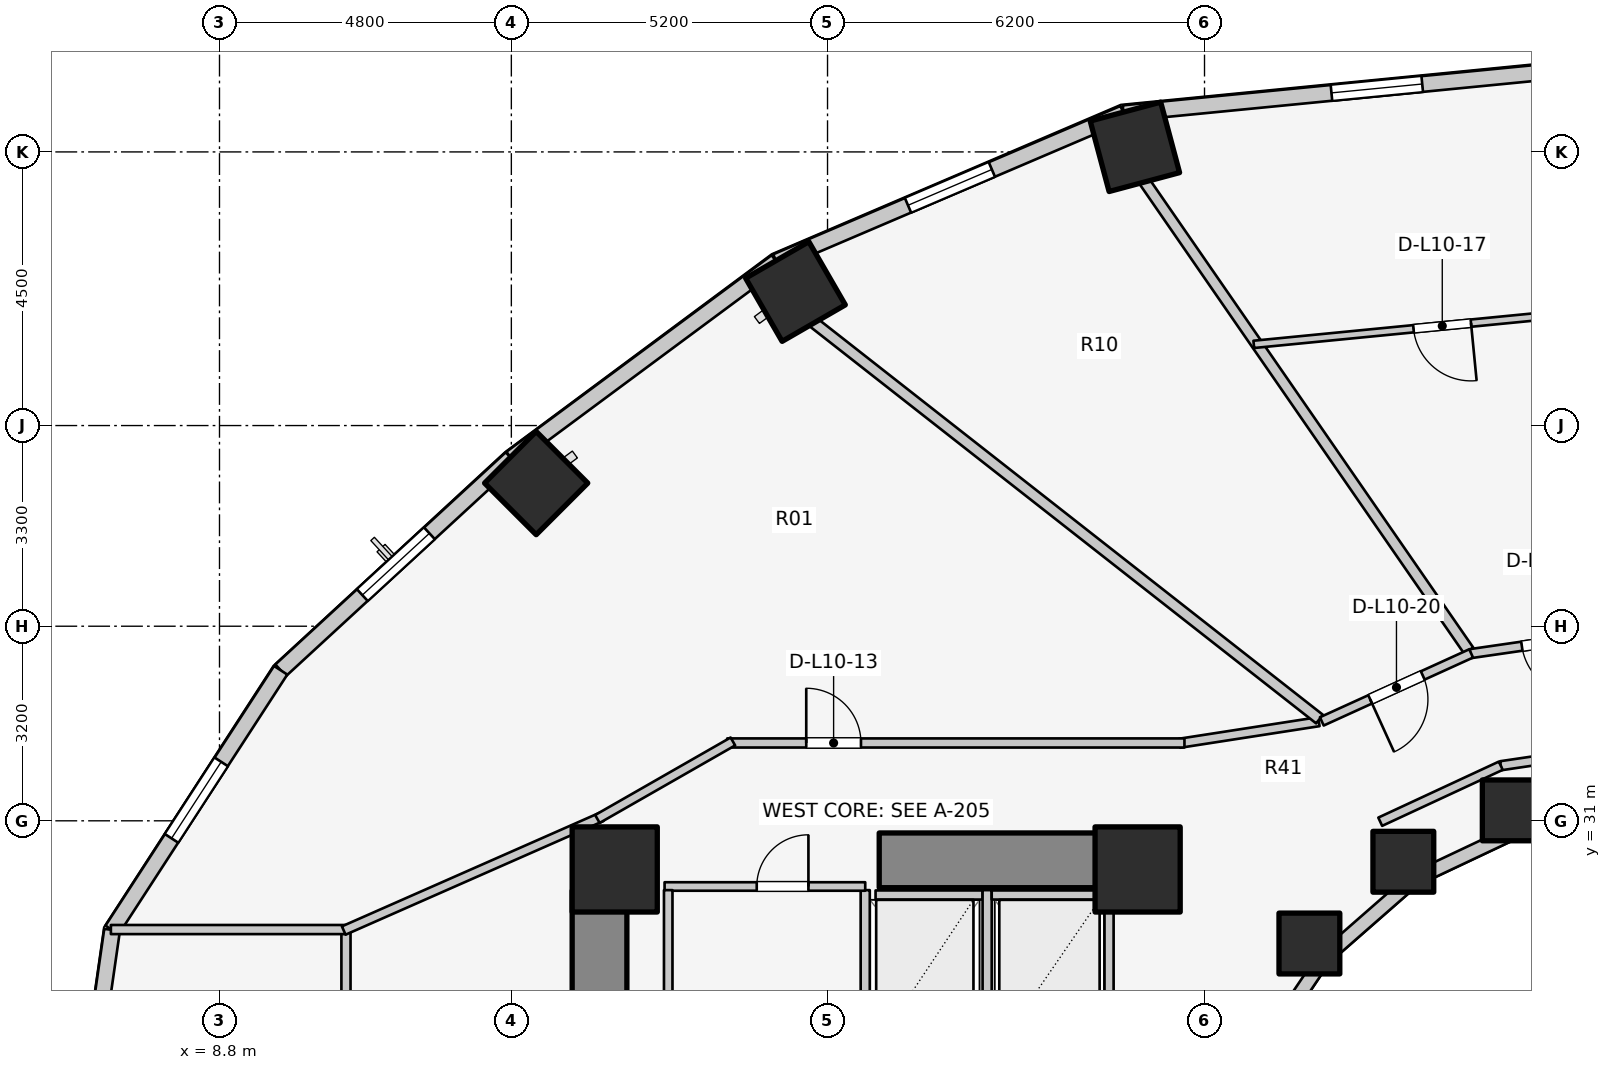
"""IFC4 building model, lengths in metres.
Left out: names, types, materials, properties, quantities, classifications, styles, units other than length and angle.
Written with IfcOpenShell. Run it as: python <this file> out.ifc"""

import sys

from ifc_helpers import new_model, si_unit, direction, frame, frame_2d, origin, origin_2d, place, context, subcontext, project, spatial, rectangle, extrude, element, fill, save


model = new_model("IFC4")
c1 = context("Model", 3, precision=1e-05, world=origin(), true_north=direction((0.0, 1.0)))
c2 = subcontext(c1, "Body", "Model", "MODEL_VIEW")
j1 = project(units=[si_unit("LENGTHUNIT", "METRE"), si_unit("PLANEANGLEUNIT", "RADIAN")], contexts=[c1])
p1 = place(None, origin())
s1 = spatial("IfcSite", under=j1, at=p1, CompositionType="ELEMENT")
p2 = place(p1, origin())
s2 = spatial("IfcBuilding", under=s1, at=p2, CompositionType="ELEMENT")
p3 = place(p2, frame((0.0, 0.0, 36.9)))
s3 = spatial("IfcBuildingStorey", under=s2, at=p3, CompositionType="ELEMENT", Elevation=36.9)
p4 = place(p3, frame((15.05, 17.05, 0.0), z_axis=(0.0, 0.0, 1.0), x_axis=(0.0, 1.0, 0.0)))
e1 = element("IfcWall", 1, at=p4, inside=s3, PredefinedType="SHEAR", context=c2, shape_type="SweptSolid", body=[
    extrude(rectangle(XDim=12.8, YDim=0.9, at=frame_2d((6.4, 0.0))), origin(), (0.0, 0.0, 1.0), 3.1),
])
p5 = place(p3, frame((19.65, 30.35, 0.0), z_axis=(0.0, 0.0, 1.0), x_axis=(1.0, 0.0, 0.0)))
e2 = element("IfcWall", 2, at=p5, inside=s3, PredefinedType="SHEAR", context=c2, shape_type="SweptSolid", body=[
    extrude(rectangle(XDim=4.5, YDim=0.9, at=frame_2d((2.25, 0.0))), origin(), (0.0, 0.0, 1.0), 3.1),
])
for number, where, z_axis, x_axis in (
    (3, (23.9, 30.2, 0.0), (0.0, 0.0, 1.0), (1.0, 0.0, 0.0)),
    (4, (15.3, 30.2, 0.0), (0.0, 0.0, 1.0), (1.0, 0.0, 0.0)),
):
    element("IfcColumn", number, at=place(p3, frame(where, z_axis=z_axis, x_axis=x_axis)), inside=s3, PredefinedType="COLUMN", context=c2, shape_type="SweptSolid", body=[
        extrude(rectangle(XDim=1.4, YDim=1.4, at=origin_2d()), origin(), (0.0, 0.0, 1.0), 3.1),
    ])
p6 = place(p3, frame((30.069, 31.172, 0.0), z_axis=(0.0, 0.0, 1.0), x_axis=(1.0, 0.0, 0.0)))
e5 = element("IfcColumn", 5, at=p6, inside=s3, PredefinedType="COLUMN", context=c2, shape_type="SweptSolid", body=[
    extrude(rectangle(XDim=1.0, YDim=1.0, at=origin_2d()), origin(), (0.0, 0.0, 1.0), 3.1),
])
p7 = place(p3, frame((23.855, 42.084, 0.0), z_axis=(0.0, 0.0, 1.0), x_axis=(-0.258819045103, 0.965925826289, 0.0)))
e6 = element("IfcColumn", 6, at=p7, inside=s3, PredefinedType="COLUMN", context=c2, shape_type="SweptSolid", body=[
    extrude(rectangle(XDim=1.2, YDim=1.2, at=origin_2d()), origin(), (0.0, 0.0, 1.0), 3.1),
])
p8 = place(p3, frame((28.27, 30.327, 0.0), z_axis=(0.0, 0.0, 1.0), x_axis=(1.0, 0.0, 0.0)))
e7 = element("IfcColumn", 7, at=p8, inside=s3, PredefinedType="COLUMN", context=c2, shape_type="SweptSolid", body=[
    extrude(rectangle(XDim=1.0, YDim=1.0, at=origin_2d()), origin(), (0.0, 0.0, 1.0), 3.1),
])
p9 = place(p3, frame((18.273, 39.704, 0.0), z_axis=(0.0, 0.0, 1.0), x_axis=(-0.5, 0.866025403784, 0.0)))
e8 = element("IfcColumn", 8, at=p9, inside=s3, PredefinedType="COLUMN", context=c2, shape_type="SweptSolid", body=[
    extrude(rectangle(XDim=1.2, YDim=1.2, at=origin_2d()), origin(), (0.0, 0.0, 1.0), 3.1),
])
p10 = place(p3, frame((26.725, 28.982, 0.0), z_axis=(0.0, 0.0, 1.0), x_axis=(1.0, 0.0, 0.0)))
e9 = element("IfcColumn", 9, at=p10, inside=s3, PredefinedType="COLUMN", context=c2, shape_type="SweptSolid", body=[
    extrude(rectangle(XDim=1.0, YDim=1.0, at=origin_2d()), origin(), (0.0, 0.0, 1.0), 3.1),
])
p11 = place(p3, frame((14.008, 36.554, 0.0), z_axis=(0.0, 0.0, 1.0), x_axis=(-0.707106781187, 0.707106781187, 0.0)))
e10 = element("IfcColumn", 10, at=p11, inside=s3, PredefinedType="COLUMN", context=c2, shape_type="SweptSolid", body=[
    extrude(rectangle(XDim=1.2, YDim=1.2, at=origin_2d()), origin(), (0.0, 0.0, 1.0), 3.1),
])
p12 = place(p3, frame((32.0, 31.12, 0.0), z_axis=(0.0, 0.0, 1.0), x_axis=(-0.988901730308, -0.148571086668, 0.0)))
e11 = element("IfcWall", 11, at=p12, inside=s3, PredefinedType="STANDARD", context=c2, shape_type="SweptSolid", body=[
    extrude(rectangle(XDim=1.864, YDim=0.23, at=frame_2d((0.932, 0.0))), origin(), (0.0, 0.0, 1.0), 2.16),
])
p13 = place(p3, frame((30.157, 30.843, 0.0), z_axis=(0.0, 0.0, 1.0), x_axis=(-0.904179699603, -0.427152280606, 0.0)))
e12 = element("IfcWall", 12, at=p13, inside=s3, PredefinedType="STANDARD", context=c2, shape_type="SweptSolid", body=[
    extrude(rectangle(XDim=1.899, YDim=0.23, at=frame_2d((0.95, 0.0))), origin(), (0.0, 0.0, 1.0), 2.16),
])
p14 = place(p3, frame((28.44, 30.032, 0.0), z_axis=(0.0, 0.0, 1.0), x_axis=(-0.752576694707, -0.658504607869, 0.0)))
e13 = element("IfcWall", 13, at=p14, inside=s3, PredefinedType="STANDARD", context=c2, shape_type="SweptSolid", body=[
    extrude(rectangle(XDim=1.959, YDim=0.23, at=frame_2d((0.98, 0.0))), origin(), (0.0, 0.0, 1.0), 2.16),
])
p15 = place(p3, frame((26.965, 28.742, 0.0), z_axis=(0.0, 0.0, 1.0), x_axis=(-0.558197800898, -0.829707909492, 0.0)))
e14 = element("IfcWall", 14, at=p15, inside=s3, PredefinedType="STANDARD", context=c2, shape_type="SweptSolid", body=[
    extrude(rectangle(XDim=2.027, YDim=0.23, at=frame_2d((1.013, 0.0))), origin(), (0.0, 0.0, 1.0), 2.16),
])
p16 = place(p3, frame((32.0, 43.451, 0.0), z_axis=(0.0, 0.0, 1.0), x_axis=(-0.995247718352, -0.097375454379, 0.0)))
e15 = element("IfcWall", 15, at=p16, inside=s3, PredefinedType="STANDARD", context=c2, shape_type="SweptSolid", body=[
    extrude(rectangle(XDim=8.372, YDim=0.26, at=frame_2d((4.186, 0.0))), origin(), (0.0, 0.0, 1.0), 2.85),
])
p17 = place(p16, frame((3.436, 0.0, 0.75)))
e16 = element("IfcOpeningElement", 16, at=p17, cuts=e15, PredefinedType="OPENING", context=c2, shape_type="SweptSolid", body=[
    extrude(rectangle(XDim=1.5, YDim=1.6, at=frame_2d((0.75, 0.8))), frame((0.0, 0.14, 0.0), z_axis=(0.0, -1.0, 0.0), x_axis=(1.0, 0.0, 0.0)), (0.0, 0.0, 1.0), 0.28),
])
p18 = place(p3, frame((23.668, 42.636, 0.0), z_axis=(0.0, 0.0, 1.0), x_axis=(-0.919612132394, -0.39282760335, 0.0)))
e17 = element("IfcWall", 17, at=p18, inside=s3, PredefinedType="STANDARD", context=c2, shape_type="SweptSolid", body=[
    extrude(rectangle(XDim=6.209, YDim=0.26, at=frame_2d((3.105, 0.0))), origin(), (0.0, 0.0, 1.0), 2.85),
])
p19 = place(p18, frame((2.355, 0.0, 0.75)))
e18 = element("IfcOpeningElement", 18, at=p19, cuts=e17, PredefinedType="OPENING", context=c2, shape_type="SweptSolid", body=[
    extrude(rectangle(XDim=1.5, YDim=1.6, at=frame_2d((0.75, 0.8))), frame((0.0, 0.14, 0.0), z_axis=(0.0, -1.0, 0.0), x_axis=(1.0, 0.0, 0.0)), (0.0, 0.0, 1.0), 0.28),
])
p20 = place(p3, frame((17.958, 40.197, 0.0), z_axis=(0.0, 0.0, 1.0), x_axis=(-0.803477531792, -0.595335078679, 0.0)))
e19 = element("IfcWall", 19, at=p20, inside=s3, PredefinedType="STANDARD", context=c2, shape_type="SweptSolid", body=[
    extrude(rectangle(XDim=5.43, YDim=0.26, at=frame_2d((2.715, 0.0))), origin(), (0.0, 0.0, 1.0), 2.85),
])
p21 = place(p3, frame((13.595, 36.965, 0.0), z_axis=(0.0, 0.0, 1.0), x_axis=(-0.735655109293, -0.67735630223, 0.0)))
e20 = element("IfcWall", 20, at=p21, inside=s3, PredefinedType="STANDARD", context=c2, shape_type="SweptSolid", body=[
    extrude(rectangle(XDim=5.151, YDim=0.26, at=frame_2d((2.575, 0.0))), origin(), (0.0, 0.0, 1.0), 2.85),
])
p22 = place(p21, frame((1.825, 0.0, 0.75)))
e21 = element("IfcOpeningElement", 21, at=p22, cuts=e20, PredefinedType="OPENING", context=c2, shape_type="SweptSolid", body=[
    extrude(rectangle(XDim=1.5, YDim=1.6, at=frame_2d((0.75, 0.8))), frame((0.0, 0.14, 0.0), z_axis=(0.0, -1.0, 0.0), x_axis=(1.0, 0.0, 0.0)), (0.0, 0.0, 1.0), 0.28),
])
p23 = place(p3, frame((9.806, 33.476, 0.0), z_axis=(0.0, 0.0, 1.0), x_axis=(-0.544578722263, -0.838709732421, 0.0)))
e22 = element("IfcWall", 22, at=p23, inside=s3, PredefinedType="STANDARD", context=c2, shape_type="SweptSolid", body=[
    extrude(rectangle(XDim=5.092, YDim=0.26, at=frame_2d((2.546, 0.0))), origin(), (0.0, 0.0, 1.0), 2.85),
])
p24 = place(p23, frame((1.796, 0.0, 0.75)))
e23 = element("IfcOpeningElement", 23, at=p24, cuts=e22, PredefinedType="OPENING", context=c2, shape_type="SweptSolid", body=[
    extrude(rectangle(XDim=1.5, YDim=1.6, at=frame_2d((0.75, 0.8))), frame((0.0, 0.14, 0.0), z_axis=(0.0, -1.0, 0.0), x_axis=(1.0, 0.0, 0.0)), (0.0, 0.0, 1.0), 0.28),
])
p25 = place(p3, frame((7.033, 29.205, 0.0), z_axis=(0.0, 0.0, 1.0), x_axis=(-0.142528001686, -0.989790770181, 0.0)))
e24 = element("IfcWall", 24, at=p25, inside=s3, PredefinedType="STANDARD", context=c2, shape_type="SweptSolid", body=[
    extrude(rectangle(XDim=6.269, YDim=0.26, at=frame_2d((3.135, 0.0))), origin(), (0.0, 0.0, 1.0), 2.85),
])
p26 = place(p25, frame((1.935, 0.0, 0.75)))
e25 = element("IfcOpeningElement", 25, at=p26, cuts=e24, PredefinedType="OPENING", context=c2, shape_type="SweptSolid", body=[
    extrude(rectangle(XDim=2.4, YDim=1.7, at=frame_2d((1.2, 0.85))), frame((0.0, 0.14, 0.0), z_axis=(0.0, -1.0, 0.0), x_axis=(1.0, 0.0, 0.0)), (0.0, 0.0, 1.0), 0.28),
])
p27 = place(p3, frame((19.59, 29.78, 0.0), z_axis=(0.0, 0.0, 1.0), x_axis=(1.0, 0.0, 0.0)))
e26 = element("IfcWall", 26, at=p27, inside=s3, PredefinedType="SOLIDWALL", context=c2, shape_type="SweptSolid", body=[
    extrude(rectangle(XDim=1.76, YDim=0.15, at=frame_2d((0.88, 0.0))), origin(), (0.0, 0.0, 1.0), 2.855),
])
for number, where, z_axis, x_axis in (
    (27, (19.42, 27.14, 0.0), (0.0, 0.0, 1.0), (0.0, 1.0, 0.0)),
    (28, (21.425, 27.14, 0.0), (0.0, 0.0, 1.0), (0.0, 1.0, 0.0)),
):
    element("IfcWall", number, at=place(p3, frame(where, z_axis=z_axis, x_axis=x_axis)), inside=s3, PredefinedType="SOLIDWALL", context=c2, shape_type="SweptSolid", body=[
        extrude(rectangle(XDim=2.72, YDim=0.15, at=frame_2d((1.36, 0.0))), origin(), (0.0, 0.0, 1.0), 2.855),
    ])
p28 = place(p3, frame((21.5, 29.78, 0.0), z_axis=(0.0, 0.0, 1.0), x_axis=(1.0, 0.0, 0.0)))
e29 = element("IfcWall", 29, at=p28, inside=s3, PredefinedType="SOLIDWALL", context=c2, shape_type="SweptSolid", body=[
    extrude(rectangle(XDim=1.76, YDim=0.15, at=frame_2d((0.88, 0.0))), origin(), (0.0, 0.0, 1.0), 2.855),
])
p29 = place(p3, frame((23.43, 27.14, 0.0), z_axis=(0.0, 0.0, 1.0), x_axis=(0.0, 1.0, 0.0)))
e30 = element("IfcWall", 30, at=p29, inside=s3, PredefinedType="SOLIDWALL", context=c2, shape_type="SweptSolid", body=[
    extrude(rectangle(XDim=2.72, YDim=0.15, at=frame_2d((1.36, 0.0))), origin(), (0.0, 0.0, 1.0), 2.855),
])
p30 = place(p3, frame((16.12, 29.92, 0.0), z_axis=(0.0, 0.0, 1.0), x_axis=(1.0, 0.0, 0.0)))
e31 = element("IfcWall", 31, at=p30, inside=s3, PredefinedType="PLUMBINGWALL", context=c2, shape_type="SweptSolid", body=[
    extrude(rectangle(XDim=3.3, YDim=0.14, at=frame_2d((1.65, 0.0))), origin(), (0.0, 0.0, 1.0), 2.855),
])
p31 = place(p30, frame((1.516, 0.0, 0.0)))
e32 = element("IfcOpeningElement", 32, at=p31, cuts=e31, PredefinedType="OPENING", context=c2, shape_type="SweptSolid", body=[
    extrude(rectangle(XDim=0.85, YDim=2.05, at=frame_2d((0.425, 1.025))), frame((0.0, 0.08, 0.0), z_axis=(0.0, -1.0, 0.0), x_axis=(1.0, 0.0, 0.0)), (0.0, 0.0, 1.0), 0.16),
])
p32 = place(p3, frame((16.18, 25.98, 0.0), z_axis=(0.0, 0.0, 1.0), x_axis=(0.0, 1.0, 0.0)))
e33 = element("IfcWall", 33, at=p32, inside=s3, PredefinedType="PLUMBINGWALL", context=c2, shape_type="SweptSolid", body=[
    extrude(rectangle(XDim=3.88, YDim=0.14, at=frame_2d((1.94, 0.0))), origin(), (0.0, 0.0, 1.0), 2.855),
])
p33 = place(p3, frame((32.0, 32.22, 0.0), z_axis=(0.0, 0.0, 1.0), x_axis=(-0.989268584896, -0.146108408166, 0.0)))
e34 = element("IfcWall", 34, at=p33, inside=s3, PredefinedType="PARTITIONING", context=c2, shape_type="SweptSolid", body=[
    extrude(rectangle(XDim=2.151, YDim=0.15, at=frame_2d((1.075, 0.0))), origin(), (0.0, 0.0, 1.0), 2.237),
])
p34 = place(p3, frame((29.873, 31.906, 0.0), z_axis=(0.0, 0.0, 1.0), x_axis=(-0.906943449489, -0.421252393975, 0.0)))
e35 = element("IfcWall", 35, at=p34, inside=s3, PredefinedType="PARTITIONING", context=c2, shape_type="SweptSolid", body=[
    extrude(rectangle(XDim=2.186, YDim=0.15, at=frame_2d((1.093, 0.0))), origin(), (0.0, 0.0, 1.0), 2.237),
])
p35 = place(p3, frame((10.88, 16.748, 0.0), z_axis=(0.0, 0.0, 1.0), x_axis=(0.0, 1.0, 0.0)))
e36 = element("IfcWall", 36, at=p35, inside=s3, PredefinedType="PARTITIONING", context=c2, shape_type="SweptSolid", body=[
    extrude(rectangle(XDim=12.503, YDim=0.15, at=frame_2d((6.252, 0.0))), origin(), (0.0, 0.0, 1.0), 2.12),
])
p36 = place(p3, frame((7.014, 29.212, 0.0), z_axis=(0.0, 0.0, 1.0), x_axis=(1.0, 0.0, 0.0)))
e37 = element("IfcWall", 37, at=p36, inside=s3, PredefinedType="PARTITIONING", context=c2, shape_type="SweptSolid", body=[
    extrude(rectangle(XDim=3.866, YDim=0.15, at=frame_2d((1.933, 0.0))), origin(), (0.0, 0.0, 1.0), 2.855),
])
p37 = place(p3, frame((10.844, 29.196, 0.0), z_axis=(0.0, 0.0, 1.0), x_axis=(0.91502756289, 0.403391322604, 0.0)))
e38 = element("IfcWall", 38, at=p37, inside=s3, PredefinedType="PARTITIONING", context=c2, shape_type="SweptSolid", body=[
    extrude(rectangle(XDim=4.637, YDim=0.15, at=frame_2d((2.319, 0.0))), origin(), (0.0, 0.0, 1.0), 2.069),
])
p38 = place(p3, frame((26.881, 32.631, 0.0), z_axis=(0.0, 0.0, 1.0), x_axis=(-0.988184633586, -0.153268163508, 0.0)))
e39 = element("IfcWall", 39, at=p38, inside=s3, PredefinedType="PARTITIONING", context=c2, shape_type="SweptSolid", body=[
    extrude(rectangle(XDim=2.318, YDim=0.15, at=frame_2d((1.159, 0.0))), origin(), (0.0, 0.0, 1.0), 2.237),
])
p39 = place(p3, frame((17.15, 32.28, 0.0), z_axis=(0.0, 0.0, 1.0), x_axis=(1.0, 0.0, 0.0)))
e40 = element("IfcWall", 40, at=p39, inside=s3, PredefinedType="PARTITIONING", context=c2, shape_type="SweptSolid", body=[
    extrude(rectangle(XDim=7.52, YDim=0.15, at=frame_2d((3.76, 0.0))), origin(), (0.0, 0.0, 1.0), 2.237),
])
p40 = place(p39, frame((1.3, 0.0, 0.0)))
e41 = element("IfcOpeningElement", 41, at=p40, cuts=e40, PredefinedType="OPENING", context=c2, shape_type="SweptSolid", body=[
    extrude(rectangle(XDim=0.9, YDim=2.1, at=frame_2d((0.45, 1.05))), frame((0.0, 0.085, 0.0), z_axis=(0.0, -1.0, 0.0), x_axis=(1.0, 0.0, 0.0)), (0.0, 0.0, 1.0), 0.17),
])
p41 = place(p3, frame((17.243, 32.305, 0.0), z_axis=(0.0, 0.0, 1.0), x_axis=(-0.867991349648, -0.496579315857, 0.0)))
e42 = element("IfcWall", 42, at=p41, inside=s3, PredefinedType="PARTITIONING", context=c2, shape_type="SweptSolid", body=[
    extrude(rectangle(XDim=2.567, YDim=0.15, at=frame_2d((1.283, 0.0))), origin(), (0.0, 0.0, 1.0), 2.069),
])
p42 = place(p3, frame((29.347, 33.796, 0.0), z_axis=(0.0, 0.0, 1.0), x_axis=(-0.568631434817, 0.822592421153, 0.0)))
e43 = element("IfcWall", 43, at=p42, inside=s3, PredefinedType="PARTITIONING", context=c2, shape_type="SweptSolid", body=[
    extrude(rectangle(XDim=9.394, YDim=0.18, at=frame_2d((4.697, 0.0))), origin(), (0.0, 0.0, 1.0), 2.237),
])
p43 = place(p3, frame((26.892, 32.673, 0.0), z_axis=(0.0, 0.0, 1.0), x_axis=(-0.78700868866, 0.616941912966, 0.0)))
e44 = element("IfcWall", 44, at=p43, inside=s3, PredefinedType="PARTITIONING", context=c2, shape_type="SweptSolid", body=[
    extrude(rectangle(XDim=10.583, YDim=0.18, at=frame_2d((5.292, 0.0))), origin(), (0.0, 0.0, 1.0), 2.237),
])
p44 = place(p3, frame((32.01, 39.441, 0.0), z_axis=(0.0, 0.0, 1.0), x_axis=(-0.995257435484, -0.097276087063, 0.0)))
e45 = element("IfcWall", 45, at=p44, inside=s3, PredefinedType="MOVABLE", context=c2, shape_type="SweptSolid", body=[
    extrude(rectangle(XDim=6.229, YDim=0.12, at=frame_2d((3.115, 0.0))), origin(), (0.0, 0.0, 1.0), 2.237),
])
p45 = place(p44, frame((2.64, 0.0, 0.0)))
e46 = element("IfcOpeningElement", 46, at=p45, cuts=e45, PredefinedType="OPENING", context=c2, shape_type="SweptSolid", body=[
    extrude(rectangle(XDim=0.95, YDim=2.1, at=frame_2d((0.475, 1.05))), frame((0.0, 0.07, 0.0), z_axis=(0.0, -1.0, 0.0), x_axis=(1.0, 0.0, 0.0)), (0.0, 0.0, 1.0), 0.14),
])
p46 = place(p3, frame((32.007, 34.13, 0.0), z_axis=(0.0, 0.0, 1.0), x_axis=(-0.989707881179, -0.143102445584, 0.0)))
e47 = element("IfcWall", 47, at=p46, inside=s3, PredefinedType="PARTITIONING", context=c2, shape_type="SweptSolid", body=[
    extrude(rectangle(XDim=2.663, YDim=0.15, at=frame_2d((1.332, 0.0))), origin(), (0.0, 0.0, 1.0), 2.237),
])
p47 = place(p46, frame((0.857, 0.0, 0.0)))
e48 = element("IfcOpeningElement", 48, at=p47, cuts=e47, PredefinedType="OPENING", context=c2, shape_type="SweptSolid", body=[
    extrude(rectangle(XDim=0.95, YDim=2.1, at=frame_2d((0.475, 1.05))), frame((0.0, 0.085, 0.0), z_axis=(0.0, -1.0, 0.0), x_axis=(1.0, 0.0, 0.0)), (0.0, 0.0, 1.0), 0.17),
])
p48 = place(p3, frame((29.385, 33.753, 0.0), z_axis=(0.0, 0.0, 1.0), x_axis=(-0.910186679378, -0.414198272186, 0.0)))
e49 = element("IfcWall", 49, at=p48, inside=s3, PredefinedType="PARTITIONING", context=c2, shape_type="SweptSolid", body=[
    extrude(rectangle(XDim=2.698, YDim=0.15, at=frame_2d((1.349, 0.0))), origin(), (0.0, 0.0, 1.0), 2.237),
])
p49 = place(p48, frame((0.874, 0.0, 0.0)))
e50 = element("IfcOpeningElement", 50, at=p49, cuts=e49, PredefinedType="OPENING", context=c2, shape_type="SweptSolid", body=[
    extrude(rectangle(XDim=0.95, YDim=2.1, at=frame_2d((0.475, 1.05))), frame((0.0, 0.085, 0.0), z_axis=(0.0, -1.0, 0.0), x_axis=(1.0, 0.0, 0.0)), (0.0, 0.0, 1.0), 0.17),
])
p50 = place(p17, origin())
e51 = element("IfcWindow", 51, at=p50, inside=s3, PartitioningType="SINGLE_PANEL", PredefinedType="WINDOW", context=c2, shape_type="SweptSolid", body=[
    extrude(rectangle(XDim=1.5, YDim=1.6, at=frame_2d((0.75, 0.8))), frame((0.0, 0.03, 0.0), z_axis=(0.0, -1.0, 0.0), x_axis=(1.0, 0.0, 0.0)), (0.0, 0.0, 1.0), 0.06),
])
fill(e16, e51)
p51 = place(p19, origin())
e52 = element("IfcWindow", 52, at=p51, inside=s3, PartitioningType="SINGLE_PANEL", PredefinedType="WINDOW", context=c2, shape_type="SweptSolid", body=[
    extrude(rectangle(XDim=1.5, YDim=1.6, at=frame_2d((0.75, 0.8))), frame((0.0, 0.03, 0.0), z_axis=(0.0, -1.0, 0.0), x_axis=(1.0, 0.0, 0.0)), (0.0, 0.0, 1.0), 0.06),
])
fill(e18, e52)
p52 = place(p22, origin())
e53 = element("IfcWindow", 53, at=p52, inside=s3, PartitioningType="SINGLE_PANEL", PredefinedType="WINDOW", context=c2, shape_type="SweptSolid", body=[
    extrude(rectangle(XDim=1.5, YDim=1.6, at=frame_2d((0.75, 0.8))), frame((0.0, 0.03, 0.0), z_axis=(0.0, -1.0, 0.0), x_axis=(1.0, 0.0, 0.0)), (0.0, 0.0, 1.0), 0.06),
])
fill(e21, e53)
p53 = place(p24, origin())
e54 = element("IfcWindow", 54, at=p53, inside=s3, PartitioningType="SINGLE_PANEL", PredefinedType="WINDOW", context=c2, shape_type="SweptSolid", body=[
    extrude(rectangle(XDim=1.5, YDim=1.6, at=frame_2d((0.75, 0.8))), frame((0.0, 0.03, 0.0), z_axis=(0.0, -1.0, 0.0), x_axis=(1.0, 0.0, 0.0)), (0.0, 0.0, 1.0), 0.06),
])
fill(e23, e54)
p54 = place(p31, origin())
e55 = element("IfcDoor", 55, at=p54, inside=s3, OperationType="SINGLE_SWING_RIGHT", PredefinedType="DOOR", context=c2, shape_type="SweptSolid", body=[
    extrude(rectangle(XDim=0.85, YDim=2.05, at=frame_2d((0.425, 1.025))), frame((0.0, 0.025, 0.0), z_axis=(0.0, -1.0, 0.0), x_axis=(1.0, 0.0, 0.0)), (0.0, 0.0, 1.0), 0.05),
])
fill(e32, e55)
p55 = place(p40, origin())
e56 = element("IfcDoor", 56, at=p55, inside=s3, OperationType="SINGLE_SWING_LEFT", PredefinedType="DOOR", context=c2, shape_type="SweptSolid", body=[
    extrude(rectangle(XDim=0.9, YDim=2.1, at=frame_2d((0.45, 1.05))), frame((0.0, 0.025, 0.0), z_axis=(0.0, -1.0, 0.0), x_axis=(1.0, 0.0, 0.0)), (0.0, 0.0, 1.0), 0.05),
])
fill(e41, e56)
p56 = place(p45, origin())
e57 = element("IfcDoor", 57, at=p56, inside=s3, OperationType="SINGLE_SWING_LEFT", PredefinedType="DOOR", context=c2, shape_type="SweptSolid", body=[
    extrude(rectangle(XDim=0.95, YDim=2.1, at=frame_2d((0.475, 1.05))), frame((0.0, 0.025, 0.0), z_axis=(0.0, -1.0, 0.0), x_axis=(1.0, 0.0, 0.0)), (0.0, 0.0, 1.0), 0.05),
])
fill(e46, e57)
p57 = place(p47, origin())
e58 = element("IfcDoor", 58, at=p57, inside=s3, OperationType="SINGLE_SWING_LEFT", PredefinedType="DOOR", context=c2, shape_type="SweptSolid", body=[
    extrude(rectangle(XDim=0.95, YDim=2.1, at=frame_2d((0.475, 1.05))), frame((0.0, 0.025, 0.0), z_axis=(0.0, -1.0, 0.0), x_axis=(1.0, 0.0, 0.0)), (0.0, 0.0, 1.0), 0.05),
])
fill(e48, e58)
p58 = place(p49, origin())
e59 = element("IfcDoor", 59, at=p58, inside=s3, OperationType="SINGLE_SWING_RIGHT", PredefinedType="DOOR", context=c2, shape_type="SweptSolid", body=[
    extrude(rectangle(XDim=0.95, YDim=2.1, at=frame_2d((0.475, 1.05))), frame((0.0, 0.025, 0.0), z_axis=(0.0, -1.0, 0.0), x_axis=(1.0, 0.0, 0.0)), (0.0, 0.0, 1.0), 0.05),
])
fill(e50, e59)
save(model, sys.argv[1])
